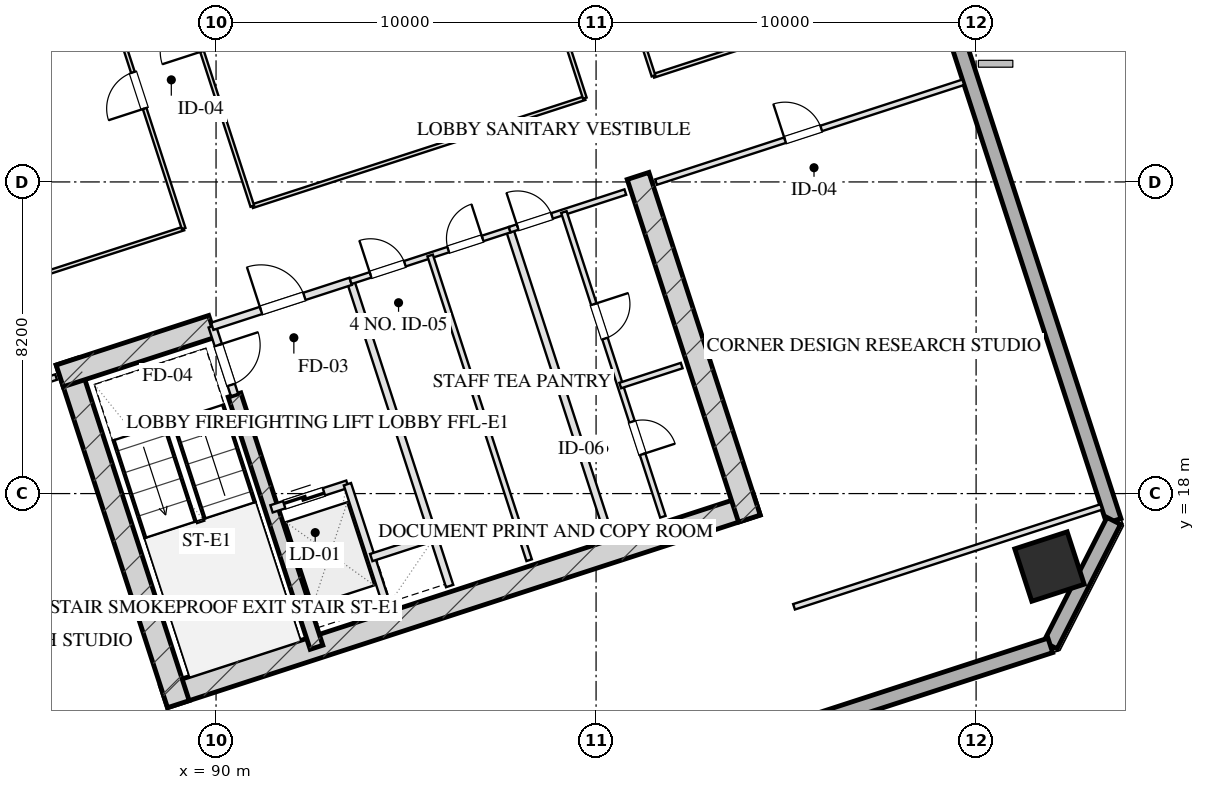
"""IFC4 building model, lengths in metres.
Left out: names, types, materials, properties, quantities, classifications, styles, units other than length and angle.
Written with IfcOpenShell. Run it as: python <this file> out.ifc"""

import sys

from ifc_helpers import new_model, si_unit, direction, frame, frame_2d, origin, origin_2d, place, context, subcontext, project, spatial, rectangle, hollow_rectangle, extrude, element, fill, save


model = new_model("IFC4")
c1 = context("Model", 3, precision=1e-05, world=origin(), true_north=direction((0.0, 1.0)))
c2 = subcontext(c1, "Body", "Model", "MODEL_VIEW")
j1 = project(units=[si_unit("LENGTHUNIT", "METRE"), si_unit("PLANEANGLEUNIT", "RADIAN")], contexts=[c1])
p1 = place(None, origin())
s1 = spatial("IfcSite", under=j1, at=p1, CompositionType="ELEMENT")
p2 = place(p1, origin())
s2 = spatial("IfcBuilding", under=s1, at=p2, CompositionType="ELEMENT")
p3 = place(p2, frame((0.0, 0.0, 131.1)))
s3 = spatial("IfcBuildingStorey", under=s2, at=p3, CompositionType="ELEMENT", Elevation=131.1)
p4 = place(p3, frame((88.63, 12.652, 0.0), z_axis=(0.0, 0.0, 1.0), x_axis=(0.95105714907, 0.309015046886, 0.0)))
e1 = element("IfcWall", 1, at=p4, inside=s3, PredefinedType="SHEAR", context=c2, shape_type="SweptSolid", body=[
    extrude(rectangle(XDim=16.4, YDim=0.6, at=frame_2d((8.2, 0.0))), origin(), (0.0, 0.0, 1.0), 3.45),
])
p5 = place(p3, frame((86.078, 21.475, 0.0), z_axis=(0.0, 0.0, 1.0), x_axis=(0.309017938678, -0.951056209472, 0.0)))
e2 = element("IfcWall", 2, at=p5, inside=s3, PredefinedType="SHEAR", context=c2, shape_type="SweptSolid", body=[
    extrude(rectangle(XDim=9.48, YDim=0.6, at=frame_2d((4.74, 0.0))), origin(), (0.0, 0.0, 1.0), 3.45),
])
p6 = place(p3, frame((101.105, 26.358, 0.0), z_axis=(0.0, 0.0, 1.0), x_axis=(0.309010370028, -0.95105866865, 0.0)))
e3 = element("IfcWall", 3, at=p6, inside=s3, PredefinedType="SHEAR", context=c2, shape_type="SweptSolid", body=[
    extrude(rectangle(XDim=9.48, YDim=0.6, at=frame_2d((4.74, 0.0))), origin(), (0.0, 0.0, 1.0), 3.45),
])
p7 = place(p3, frame((90.486, 20.594, 0.0), z_axis=(0.0, 0.0, 1.0), x_axis=(0.309020428229, -0.951055400562, 0.0)))
e4 = element("IfcWall", 4, at=p7, inside=s3, PredefinedType="SHEAR", context=c2, shape_type="SweptSolid", body=[
    extrude(rectangle(XDim=6.98, YDim=0.35, at=frame_2d((3.49, 0.0))), origin(), (0.0, 0.0, 1.0), 3.45),
])
p8 = place(p3, frame((85.886, 21.097, 0.0), z_axis=(0.0, 0.0, 1.0), x_axis=(0.951068073652, 0.308981422225, 0.0)))
e5 = element("IfcWall", 5, at=p8, inside=s3, PredefinedType="SHEAR", context=c2, shape_type="SweptSolid", body=[
    extrude(rectangle(XDim=4.22, YDim=0.6, at=frame_2d((2.11, 0.0))), origin(), (0.0, 0.0, 1.0), 3.45),
])
p9 = place(p3, frame((111.931, 16.08, 0.0), z_axis=(0.0, 0.0, 1.0), x_axis=(0.951056516295, 0.309016994375, 0.0)))
e6 = element("IfcColumn", 6, at=p9, inside=s3, PredefinedType="COLUMN", context=c2, shape_type="SweptSolid", body=[
    extrude(hollow_rectangle(XDim=1.45, YDim=1.45, WallThickness=0.05, at=origin_2d()), origin(), (0.0, 0.0, 1.0), 3.451),
])
p10 = place(p3, frame((99.284, 61.41, 0.0), z_axis=(0.0, 0.0, 1.0), x_axis=(0.309017542002, -0.95105633836, 0.0)))
e7 = element("IfcWall", 7, at=p10, inside=s3, PredefinedType="SOLIDWALL", context=c2, shape_type="SweptSolid", body=[
    extrude(rectangle(XDim=46.4, YDim=0.4, at=frame_2d((23.2, 0.0))), origin(), (0.0, 0.0, 1.0), 2.61),
])
p11 = place(p10, frame((25.25, 0.0, 0.0)))
e8 = element("IfcOpeningElement", 8, at=p11, cuts=e7, PredefinedType="OPENING", context=c2, shape_type="SweptSolid", body=[
    extrude(rectangle(XDim=1.1, YDim=2.15, at=frame_2d((0.55, 1.075))), frame((0.0, 0.21, 0.0), z_axis=(0.0, -1.0, 0.0), x_axis=(1.0, 0.0, 0.0)), (0.0, 0.0, 1.0), 0.42),
])
p12 = place(p3, frame((113.623, 17.281, 0.0), z_axis=(0.0, 0.0, 1.0), x_axis=(-0.454026238093, -0.890988313685, 0.0)))
e9 = element("IfcWall", 9, at=p12, inside=s3, PredefinedType="SOLIDWALL", context=c2, shape_type="SweptSolid", body=[
    extrude(rectangle(XDim=3.677, YDim=0.4, at=frame_2d((1.838, 0.0))), origin(), (0.0, 0.0, 1.0), 2.61),
])
p13 = place(p3, frame((111.953, 14.005, 0.0), z_axis=(0.0, 0.0, 1.0), x_axis=(-0.95105505922, -0.309021478754, 0.0)))
e10 = element("IfcWall", 10, at=p13, inside=s3, PredefinedType="SOLIDWALL", context=c2, shape_type="SweptSolid", body=[
    extrude(rectangle(XDim=29.4, YDim=0.4, at=frame_2d((14.7, 0.0))), origin(), (0.0, 0.0, 1.0), 2.61),
])
p14 = place(p3, frame((89.899, 22.401, 0.0), z_axis=(0.0, 0.0, 1.0), x_axis=(0.308932062672, -0.951084108086, 0.0)))
e11 = element("IfcWall", 11, at=p14, inside=s3, PredefinedType="PARTITIONING", context=c2, shape_type="SweptSolid", body=[
    extrude(rectangle(XDim=1.9, YDim=0.2, at=frame_2d((0.95, 0.0))), origin(), (0.0, 0.0, 1.0), 3.175),
])
p15 = place(p14, frame((0.52, 0.0, 0.0)))
e12 = element("IfcOpeningElement", 12, at=p15, cuts=e11, PredefinedType="OPENING", context=c2, shape_type="SweptSolid", body=[
    extrude(rectangle(XDim=1.1, YDim=2.05, at=frame_2d((0.55, 1.025))), frame((0.0, 0.11, 0.0), z_axis=(0.0, -1.0, 0.0), x_axis=(1.0, 0.0, 0.0)), (0.0, 0.0, 1.0), 0.22),
])
p16 = place(p3, frame((93.542, 23.585, 0.0), z_axis=(0.0, 0.0, 1.0), x_axis=(0.309042196757, -0.951048327176, 0.0)))
e13 = element("IfcWall", 13, at=p16, inside=s3, PredefinedType="PARTITIONING", context=c2, shape_type="SweptSolid", body=[
    extrude(rectangle(XDim=8.43, YDim=0.2, at=frame_2d((4.215, 0.0))), origin(), (0.0, 0.0, 1.0), 3.175),
])
p17 = place(p3, frame((89.899, 22.401, 0.0), z_axis=(0.0, 0.0, 1.0), x_axis=(0.951046716504, 0.309047153403, 0.0)))
e14 = element("IfcWall", 14, at=p17, inside=s3, PredefinedType="PARTITIONING", context=c2, shape_type="SweptSolid", body=[
    extrude(rectangle(XDim=3.83, YDim=0.2, at=frame_2d((1.915, 0.0))), origin(), (0.0, 0.0, 1.0), 3.175),
])
p18 = place(p17, frame((1.35, 0.0, 0.0)))
e15 = element("IfcOpeningElement", 15, at=p18, cuts=e14, PredefinedType="OPENING", context=c2, shape_type="SweptSolid", body=[
    extrude(rectangle(XDim=1.2, YDim=2.05, at=frame_2d((0.6, 1.025))), frame((0.0, 0.11, 0.0), z_axis=(0.0, -1.0, 0.0), x_axis=(1.0, 0.0, 0.0)), (0.0, 0.0, 1.0), 0.22),
])
p19 = place(p3, frame((91.46, 17.598, 0.0), z_axis=(0.0, 0.0, 1.0), x_axis=(0.951062257173, 0.308999325213, 0.0)))
e16 = element("IfcWall", 16, at=p19, inside=s3, PredefinedType="PARTITIONING", context=c2, shape_type="SweptSolid", body=[
    extrude(rectangle(XDim=2.1, YDim=0.2, at=frame_2d((1.05, 0.0))), origin(), (0.0, 0.0, 1.0), 3.175),
])
p20 = place(p19, frame((0.35, 0.0, 0.0)))
e17 = element("IfcOpeningElement", 17, at=p20, cuts=e16, PredefinedType="OPENING", context=c2, shape_type="SweptSolid", body=[
    extrude(rectangle(XDim=1.1, YDim=2.05, at=frame_2d((0.55, 1.025))), frame((0.0, 0.11, 0.0), z_axis=(0.0, -1.0, 0.0), x_axis=(1.0, 0.0, 0.0)), (0.0, 0.0, 1.0), 0.22),
])
p21 = place(p3, frame((93.457, 18.247, 0.0), z_axis=(0.0, 0.0, 1.0), x_axis=(0.3089935693, -0.951064127245, 0.0)))
e18 = element("IfcWall", 18, at=p21, inside=s3, PredefinedType="PARTITIONING", context=c2, shape_type="SweptSolid", body=[
    extrude(rectangle(XDim=3.7, YDim=0.2, at=frame_2d((1.85, 0.0))), origin(), (0.0, 0.0, 1.0), 3.175),
])
p22 = place(p3, frame((94.084, 16.317, 0.0), z_axis=(0.0, 0.0, 1.0), x_axis=(0.951041328149, 0.309063734775, 0.0)))
e19 = element("IfcWall", 19, at=p22, inside=s3, PredefinedType="PARTITIONING", context=c2, shape_type="SweptSolid", body=[
    extrude(rectangle(XDim=1.73, YDim=0.2, at=frame_2d((0.865, 0.0))), origin(), (0.0, 0.0, 1.0), 3.175),
])
p23 = place(p3, frame((97.727, 24.944, 0.0), z_axis=(0.0, 0.0, 1.0), x_axis=(0.309016001439, -0.951056838919, 0.0)))
e20 = element("IfcWall", 20, at=p23, inside=s3, PredefinedType="PARTITIONING", context=c2, shape_type="SweptSolid", body=[
    extrude(rectangle(XDim=8.43, YDim=0.2, at=frame_2d((4.215, 0.0))), origin(), (0.0, 0.0, 1.0), 3.175),
])
p24 = place(p3, frame((93.542, 23.585, 0.0), z_axis=(0.0, 0.0, 1.0), x_axis=(0.951063829732, 0.308994485023, 0.0)))
e21 = element("IfcWall", 21, at=p24, inside=s3, PredefinedType="PARTITIONING", context=c2, shape_type="SweptSolid", body=[
    extrude(rectangle(XDim=4.4, YDim=0.15, at=frame_2d((2.2, 0.0))), origin(), (0.0, 0.0, 1.0), 3.175),
])
p25 = place(p24, frame((0.55, 0.0, 0.0)))
e22 = element("IfcOpeningElement", 22, at=p25, cuts=e21, PredefinedType="OPENING", context=c2, shape_type="SweptSolid", body=[
    extrude(rectangle(XDim=0.95, YDim=2.05, at=frame_2d((0.475, 1.025))), frame((0.0, 0.085, 0.0), z_axis=(0.0, -1.0, 0.0), x_axis=(1.0, 0.0, 0.0)), (0.0, 0.0, 1.0), 0.17),
])
p26 = place(p24, frame((2.7, 0.0, 0.0)))
e23 = element("IfcOpeningElement", 23, at=p26, cuts=e21, PredefinedType="OPENING", context=c2, shape_type="SweptSolid", body=[
    extrude(rectangle(XDim=0.95, YDim=2.05, at=frame_2d((0.475, 1.025))), frame((0.0, 0.085, 0.0), z_axis=(0.0, -1.0, 0.0), x_axis=(1.0, 0.0, 0.0)), (0.0, 0.0, 1.0), 0.17),
])
p27 = place(p3, frame((95.634, 24.265, 0.0), z_axis=(0.0, 0.0, 1.0), x_axis=(0.309007490203, -0.951059604335, 0.0)))
e24 = element("IfcWall", 24, at=p27, inside=s3, PredefinedType="PARTITIONING", context=c2, shape_type="SweptSolid", body=[
    extrude(rectangle(XDim=8.43, YDim=0.15, at=frame_2d((4.215, 0.0))), origin(), (0.0, 0.0, 1.0), 3.175),
])
p28 = place(p3, frame((97.727, 24.944, 0.0), z_axis=(0.0, 0.0, 1.0), x_axis=(0.951036872128, 0.309077446369, 0.0)))
e25 = element("IfcWall", 25, at=p28, inside=s3, PredefinedType="PARTITIONING", context=c2, shape_type="SweptSolid", body=[
    extrude(rectangle(XDim=3.2, YDim=0.15, at=frame_2d((1.6, 0.0))), origin(), (0.0, 0.0, 1.0), 3.175),
])
p29 = place(p28, frame((0.22, 0.0, 0.0)))
e26 = element("IfcOpeningElement", 26, at=p29, cuts=e25, PredefinedType="OPENING", context=c2, shape_type="SweptSolid", body=[
    extrude(rectangle(XDim=0.95, YDim=2.05, at=frame_2d((0.475, 1.025))), frame((0.0, 0.085, 0.0), z_axis=(0.0, -1.0, 0.0), x_axis=(1.0, 0.0, 0.0)), (0.0, 0.0, 1.0), 0.17),
])
p30 = place(p3, frame((99.153, 25.408, 0.0), z_axis=(0.0, 0.0, 1.0), x_axis=(0.309016001439, -0.951056838919, 0.0)))
e27 = element("IfcWall", 27, at=p30, inside=s3, PredefinedType="PARTITIONING", context=c2, shape_type="SweptSolid", body=[
    extrude(rectangle(XDim=8.43, YDim=0.15, at=frame_2d((4.215, 0.0))), origin(), (0.0, 0.0, 1.0), 3.175),
])
p31 = place(p30, frame((2.55, 0.0, 0.0)))
e28 = element("IfcOpeningElement", 28, at=p31, cuts=e27, PredefinedType="OPENING", context=c2, shape_type="SweptSolid", body=[
    extrude(rectangle(XDim=0.95, YDim=2.05, at=frame_2d((0.475, 1.025))), frame((0.0, 0.085, 0.0), z_axis=(0.0, -1.0, 0.0), x_axis=(1.0, 0.0, 0.0)), (0.0, 0.0, 1.0), 0.17),
])
p32 = place(p30, frame((5.8, 0.0, 0.0)))
e29 = element("IfcOpeningElement", 29, at=p32, cuts=e27, PredefinedType="OPENING", context=c2, shape_type="SweptSolid", body=[
    extrude(rectangle(XDim=0.9, YDim=2.05, at=frame_2d((0.45, 1.025))), frame((0.0, 0.085, 0.0), z_axis=(0.0, -1.0, 0.0), x_axis=(1.0, 0.0, 0.0)), (0.0, 0.0, 1.0), 0.17),
])
p33 = place(p3, frame((100.636, 20.843, 0.0), z_axis=(0.0, 0.0, 1.0), x_axis=(0.951040401051, 0.309066587596, 0.0)))
e30 = element("IfcWall", 30, at=p33, inside=s3, PredefinedType="PARTITIONING", context=c2, shape_type="SweptSolid", body=[
    extrude(rectangle(XDim=1.7, YDim=0.15, at=frame_2d((0.85, 0.0))), origin(), (0.0, 0.0, 1.0), 3.175),
])
p34 = place(p3, frame((77.136, 18.254, 0.0), z_axis=(0.0, 0.0, 1.0), x_axis=(0.951057133767, 0.309015093986, 0.0)))
e31 = element("IfcWall", 31, at=p34, inside=s3, PredefinedType="PARTITIONING", context=c2, shape_type="SweptSolid", body=[
    extrude(rectangle(XDim=9.1, YDim=0.15, at=frame_2d((4.55, 0.0))), origin(), (0.0, 0.0, 1.0), 2.15),
])
p35 = place(p34, frame((3.822, 0.0, 0.0)))
e32 = element("IfcOpeningElement", 32, at=p35, cuts=e31, PredefinedType="OPENING", context=c2, shape_type="SweptSolid", body=[
    extrude(rectangle(XDim=1.0, YDim=2.05, at=frame_2d((0.5, 1.025))), frame((0.0, 0.085, 0.0), z_axis=(0.0, -1.0, 0.0), x_axis=(1.0, 0.0, 0.0)), (0.0, 0.0, 1.0), 0.17),
])
p36 = place(p3, frame((105.209, 15.021, 0.0), z_axis=(0.0, 0.0, 1.0), x_axis=(0.951054329824, 0.309023723562, 0.0)))
e33 = element("IfcWall", 33, at=p36, inside=s3, PredefinedType="PARTITIONING", context=c2, shape_type="SweptSolid", body=[
    extrude(rectangle(XDim=8.5, YDim=0.15, at=frame_2d((4.25, 0.0))), origin(), (0.0, 0.0, 1.0), 3.175),
])
p37 = place(p3, frame((101.578, 26.196, 0.0), z_axis=(0.0, 0.0, 1.0), x_axis=(0.951062770994, 0.308997743729, 0.0)))
e34 = element("IfcWall", 34, at=p37, inside=s3, PredefinedType="PARTITIONING", context=c2, shape_type="SweptSolid", body=[
    extrude(rectangle(XDim=8.5, YDim=0.15, at=frame_2d((4.25, 0.0))), origin(), (0.0, 0.0, 1.0), 2.15),
])
p38 = place(p37, frame((3.57, 0.0, 0.0)))
e35 = element("IfcOpeningElement", 35, at=p38, cuts=e34, PredefinedType="OPENING", context=c2, shape_type="SweptSolid", body=[
    extrude(rectangle(XDim=1.0, YDim=2.05, at=frame_2d((0.5, 1.025))), frame((0.0, 0.085, 0.0), z_axis=(0.0, -1.0, 0.0), x_axis=(1.0, 0.0, 0.0)), (0.0, 0.0, 1.0), 0.17),
])
p39 = place(p3, frame((76.308, 20.803, 0.0), z_axis=(0.0, 0.0, 1.0), x_axis=(0.951054001411, 0.309024734286, 0.0)))
e36 = element("IfcWall", 36, at=p39, inside=s3, PredefinedType="MOVABLE", context=c2, shape_type="SweptSolid", body=[
    extrude(rectangle(XDim=13.5, YDim=0.1, at=frame_2d((6.75, 0.0))), origin(), (0.0, 0.0, 1.0), 3.175),
])
p40 = place(p3, frame((90.954, 25.562, 0.0), z_axis=(0.0, 0.0, 1.0), x_axis=(0.951052398814, 0.309029666393, 0.0)))
e37 = element("IfcWall", 37, at=p40, inside=s3, PredefinedType="MOVABLE", context=c2, shape_type="SweptSolid", body=[
    extrude(rectangle(XDim=9.2, YDim=0.1, at=frame_2d((4.6, 0.0))), origin(), (0.0, 0.0, 1.0), 3.175),
])
p41 = place(p3, frame((101.511, 28.992, 0.0), z_axis=(0.0, 0.0, 1.0), x_axis=(0.951056202154, 0.3090179612, 0.0)))
e38 = element("IfcWall", 38, at=p41, inside=s3, PredefinedType="MOVABLE", context=c2, shape_type="SweptSolid", body=[
    extrude(rectangle(XDim=7.7, YDim=0.1, at=frame_2d((3.85, 0.0))), origin(), (0.0, 0.0, 1.0), 3.175),
])
p42 = place(p3, frame((89.147, 24.975, 0.0), z_axis=(0.0, 0.0, 1.0), x_axis=(-0.309022042254, 0.951054876125, 0.0)))
e39 = element("IfcWall", 39, at=p42, inside=s3, PredefinedType="MOVABLE", context=c2, shape_type="SweptSolid", body=[
    extrude(rectangle(XDim=16.64, YDim=0.1, at=frame_2d((8.32, 0.0))), origin(), (0.0, 0.0, 1.0), 3.175),
])
p43 = place(p42, frame((3.32, 0.0, 0.0)))
e40 = element("IfcOpeningElement", 40, at=p43, cuts=e39, PredefinedType="OPENING", context=c2, shape_type="SweptSolid", body=[
    extrude(rectangle(XDim=1.0, YDim=2.05, at=frame_2d((0.5, 1.025))), frame((0.0, 0.06, 0.0), z_axis=(0.0, -1.0, 0.0), x_axis=(1.0, 0.0, 0.0)), (0.0, 0.0, 1.0), 0.12),
])
p44 = place(p42, frame((11.64, 0.0, 0.0)))
e41 = element("IfcOpeningElement", 41, at=p44, cuts=e39, PredefinedType="OPENING", context=c2, shape_type="SweptSolid", body=[
    extrude(rectangle(XDim=1.0, YDim=2.05, at=frame_2d((0.5, 1.025))), frame((0.0, 0.06, 0.0), z_axis=(0.0, -1.0, 0.0), x_axis=(1.0, 0.0, 0.0)), (0.0, 0.0, 1.0), 0.12),
])
p45 = place(p3, frame((90.954, 25.562, 0.0), z_axis=(0.0, 0.0, 1.0), x_axis=(-0.30901773025, 0.951056277195, 0.0)))
e42 = element("IfcWall", 42, at=p45, inside=s3, PredefinedType="MOVABLE", context=c2, shape_type="SweptSolid", body=[
    extrude(rectangle(XDim=16.64, YDim=0.1, at=frame_2d((8.32, 0.0))), origin(), (0.0, 0.0, 1.0), 3.175),
])
p46 = place(p45, frame((4.284, 0.0, 0.0)))
e43 = element("IfcOpeningElement", 43, at=p46, cuts=e42, PredefinedType="OPENING", context=c2, shape_type="SweptSolid", body=[
    extrude(rectangle(XDim=1.1, YDim=2.05, at=frame_2d((0.55, 1.025))), frame((0.0, 0.06, 0.0), z_axis=(0.0, -1.0, 0.0), x_axis=(1.0, 0.0, 0.0)), (0.0, 0.0, 1.0), 0.12),
])
p47 = place(p45, frame((12.724, 0.0, 0.0)))
e44 = element("IfcOpeningElement", 44, at=p47, cuts=e42, PredefinedType="OPENING", context=c2, shape_type="SweptSolid", body=[
    extrude(rectangle(XDim=1.1, YDim=2.05, at=frame_2d((0.55, 1.025))), frame((0.0, 0.06, 0.0), z_axis=(0.0, -1.0, 0.0), x_axis=(1.0, 0.0, 0.0)), (0.0, 0.0, 1.0), 0.12),
])
p48 = place(p3, frame((99.704, 28.405, 0.0), z_axis=(0.0, 0.0, 1.0), x_axis=(-0.309004459387, 0.951060589068, 0.0)))
e45 = element("IfcWall", 45, at=p48, inside=s3, PredefinedType="MOVABLE", context=c2, shape_type="SweptSolid", body=[
    extrude(rectangle(XDim=16.64, YDim=0.1, at=frame_2d((8.32, 0.0))), origin(), (0.0, 0.0, 1.0), 3.175),
])
p49 = place(p3, frame((101.511, 28.992, 0.0), z_axis=(0.0, 0.0, 1.0), x_axis=(-0.30901773025, 0.951056277195, 0.0)))
e46 = element("IfcWall", 46, at=p49, inside=s3, PredefinedType="MOVABLE", context=c2, shape_type="SweptSolid", body=[
    extrude(rectangle(XDim=16.64, YDim=0.1, at=frame_2d((8.32, 0.0))), origin(), (0.0, 0.0, 1.0), 3.175),
])
p50 = place(p49, frame((1.16, 0.0, 0.0)))
e47 = element("IfcOpeningElement", 47, at=p50, cuts=e46, PredefinedType="OPENING", context=c2, shape_type="SweptSolid", body=[
    extrude(rectangle(XDim=1.0, YDim=2.05, at=frame_2d((0.5, 1.025))), frame((0.0, 0.06, 0.0), z_axis=(0.0, -1.0, 0.0), x_axis=(1.0, 0.0, 0.0)), (0.0, 0.0, 1.0), 0.12),
])
p51 = place(p49, frame((6.16, 0.0, 0.0)))
e48 = element("IfcOpeningElement", 48, at=p51, cuts=e46, PredefinedType="OPENING", context=c2, shape_type="SweptSolid", body=[
    extrude(rectangle(XDim=1.05, YDim=2.05, at=frame_2d((0.525, 1.025))), frame((0.0, 0.06, 0.0), z_axis=(0.0, -1.0, 0.0), x_axis=(1.0, 0.0, 0.0)), (0.0, 0.0, 1.0), 0.12),
])
p52 = place(p49, frame((10.16, 0.0, 0.0)))
e49 = element("IfcOpeningElement", 49, at=p52, cuts=e46, PredefinedType="OPENING", context=c2, shape_type="SweptSolid", body=[
    extrude(rectangle(XDim=1.0, YDim=2.05, at=frame_2d((0.5, 1.025))), frame((0.0, 0.06, 0.0), z_axis=(0.0, -1.0, 0.0), x_axis=(1.0, 0.0, 0.0)), (0.0, 0.0, 1.0), 0.12),
])
p53 = place(p49, frame((14.48, 0.0, 0.0)))
e50 = element("IfcOpeningElement", 50, at=p53, cuts=e46, PredefinedType="OPENING", context=c2, shape_type="SweptSolid", body=[
    extrude(rectangle(XDim=1.0, YDim=2.05, at=frame_2d((0.5, 1.025))), frame((0.0, 0.06, 0.0), z_axis=(0.0, -1.0, 0.0), x_axis=(1.0, 0.0, 0.0)), (0.0, 0.0, 1.0), 0.12),
])
p54 = place(p3, frame((73.947, 28.069, 0.0), z_axis=(0.0, 0.0, 1.0), x_axis=(0.951059316265, 0.309008376821, 0.0)))
e51 = element("IfcWall", 51, at=p54, inside=s3, PredefinedType="MOVABLE", context=c2, shape_type="SweptSolid", body=[
    extrude(rectangle(XDim=13.5, YDim=0.1, at=frame_2d((6.75, 0.0))), origin(), (0.0, 0.0, 1.0), 3.175),
])
p55 = place(p15, origin())
e52 = element("IfcDoor", 52, at=p55, inside=s3, OperationType="SINGLE_SWING_LEFT", PredefinedType="DOOR", context=c2, shape_type="SweptSolid", body=[
    extrude(rectangle(XDim=1.1, YDim=2.05, at=frame_2d((0.55, 1.025))), frame((0.0, 0.025, 0.0), z_axis=(0.0, -1.0, 0.0), x_axis=(1.0, 0.0, 0.0)), (0.0, 0.0, 1.0), 0.05),
])
fill(e12, e52)
p56 = place(p18, origin())
e53 = element("IfcDoor", 53, at=p56, inside=s3, OperationType="SINGLE_SWING_LEFT", PredefinedType="DOOR", context=c2, shape_type="SweptSolid", body=[
    extrude(rectangle(XDim=1.2, YDim=2.05, at=frame_2d((0.6, 1.025))), frame((0.0, 0.025, 0.0), z_axis=(0.0, -1.0, 0.0), x_axis=(1.0, 0.0, 0.0)), (0.0, 0.0, 1.0), 0.05),
])
fill(e15, e53)
p57 = place(p20, origin())
e54 = element("IfcDoor", 54, at=p57, inside=s3, OperationType="DOUBLE_DOOR_SLIDING", PredefinedType="DOOR", context=c2, shape_type="SweptSolid", body=[
    extrude(rectangle(XDim=1.1, YDim=2.05, at=frame_2d((0.55, 1.025))), frame((0.0, 0.025, 0.0), z_axis=(0.0, -1.0, 0.0), x_axis=(1.0, 0.0, 0.0)), (0.0, 0.0, 1.0), 0.05),
])
fill(e17, e54)
p58 = place(p25, origin())
e55 = element("IfcDoor", 55, at=p58, inside=s3, OperationType="SINGLE_SWING_LEFT", PredefinedType="DOOR", context=c2, shape_type="SweptSolid", body=[
    extrude(rectangle(XDim=0.95, YDim=2.05, at=frame_2d((0.475, 1.025))), frame((0.0, 0.025, 0.0), z_axis=(0.0, -1.0, 0.0), x_axis=(1.0, 0.0, 0.0)), (0.0, 0.0, 1.0), 0.05),
])
fill(e22, e55)
p59 = place(p26, origin())
e56 = element("IfcDoor", 56, at=p59, inside=s3, OperationType="SINGLE_SWING_RIGHT", PredefinedType="DOOR", context=c2, shape_type="SweptSolid", body=[
    extrude(rectangle(XDim=0.95, YDim=2.05, at=frame_2d((0.475, 1.025))), frame((0.0, 0.025, 0.0), z_axis=(0.0, -1.0, 0.0), x_axis=(1.0, 0.0, 0.0)), (0.0, 0.0, 1.0), 0.05),
])
fill(e23, e56)
p60 = place(p29, origin())
e57 = element("IfcDoor", 57, at=p60, inside=s3, OperationType="SINGLE_SWING_LEFT", PredefinedType="DOOR", context=c2, shape_type="SweptSolid", body=[
    extrude(rectangle(XDim=0.95, YDim=2.05, at=frame_2d((0.475, 1.025))), frame((0.0, 0.025, 0.0), z_axis=(0.0, -1.0, 0.0), x_axis=(1.0, 0.0, 0.0)), (0.0, 0.0, 1.0), 0.05),
])
fill(e26, e57)
p61 = place(p31, origin())
e58 = element("IfcDoor", 58, at=p61, inside=s3, OperationType="SINGLE_SWING_LEFT", PredefinedType="DOOR", context=c2, shape_type="SweptSolid", body=[
    extrude(rectangle(XDim=0.95, YDim=2.05, at=frame_2d((0.475, 1.025))), frame((0.0, 0.025, 0.0), z_axis=(0.0, -1.0, 0.0), x_axis=(1.0, 0.0, 0.0)), (0.0, 0.0, 1.0), 0.05),
])
fill(e28, e58)
p62 = place(p32, origin())
e59 = element("IfcDoor", 59, at=p62, inside=s3, OperationType="SINGLE_SWING_RIGHT", PredefinedType="DOOR", context=c2, shape_type="SweptSolid", body=[
    extrude(rectangle(XDim=0.9, YDim=2.05, at=frame_2d((0.45, 1.025))), frame((0.0, 0.025, 0.0), z_axis=(0.0, -1.0, 0.0), x_axis=(1.0, 0.0, 0.0)), (0.0, 0.0, 1.0), 0.05),
])
fill(e29, e59)
p63 = place(p38, origin())
e60 = element("IfcDoor", 60, at=p63, inside=s3, OperationType="SINGLE_SWING_LEFT", PredefinedType="DOOR", context=c2, shape_type="SweptSolid", body=[
    extrude(rectangle(XDim=1.0, YDim=2.05, at=frame_2d((0.5, 1.025))), frame((0.0, 0.025, 0.0), z_axis=(0.0, -1.0, 0.0), x_axis=(1.0, 0.0, 0.0)), (0.0, 0.0, 1.0), 0.05),
])
fill(e35, e60)
p64 = place(p43, origin())
e61 = element("IfcDoor", 61, at=p64, inside=s3, OperationType="SINGLE_SWING_LEFT", PredefinedType="DOOR", context=c2, shape_type="SweptSolid", body=[
    extrude(rectangle(XDim=1.0, YDim=2.05, at=frame_2d((0.5, 1.025))), frame((0.0, 0.025, 0.0), z_axis=(0.0, -1.0, 0.0), x_axis=(1.0, 0.0, 0.0)), (0.0, 0.0, 1.0), 0.05),
])
fill(e40, e61)
save(model, sys.argv[1])
